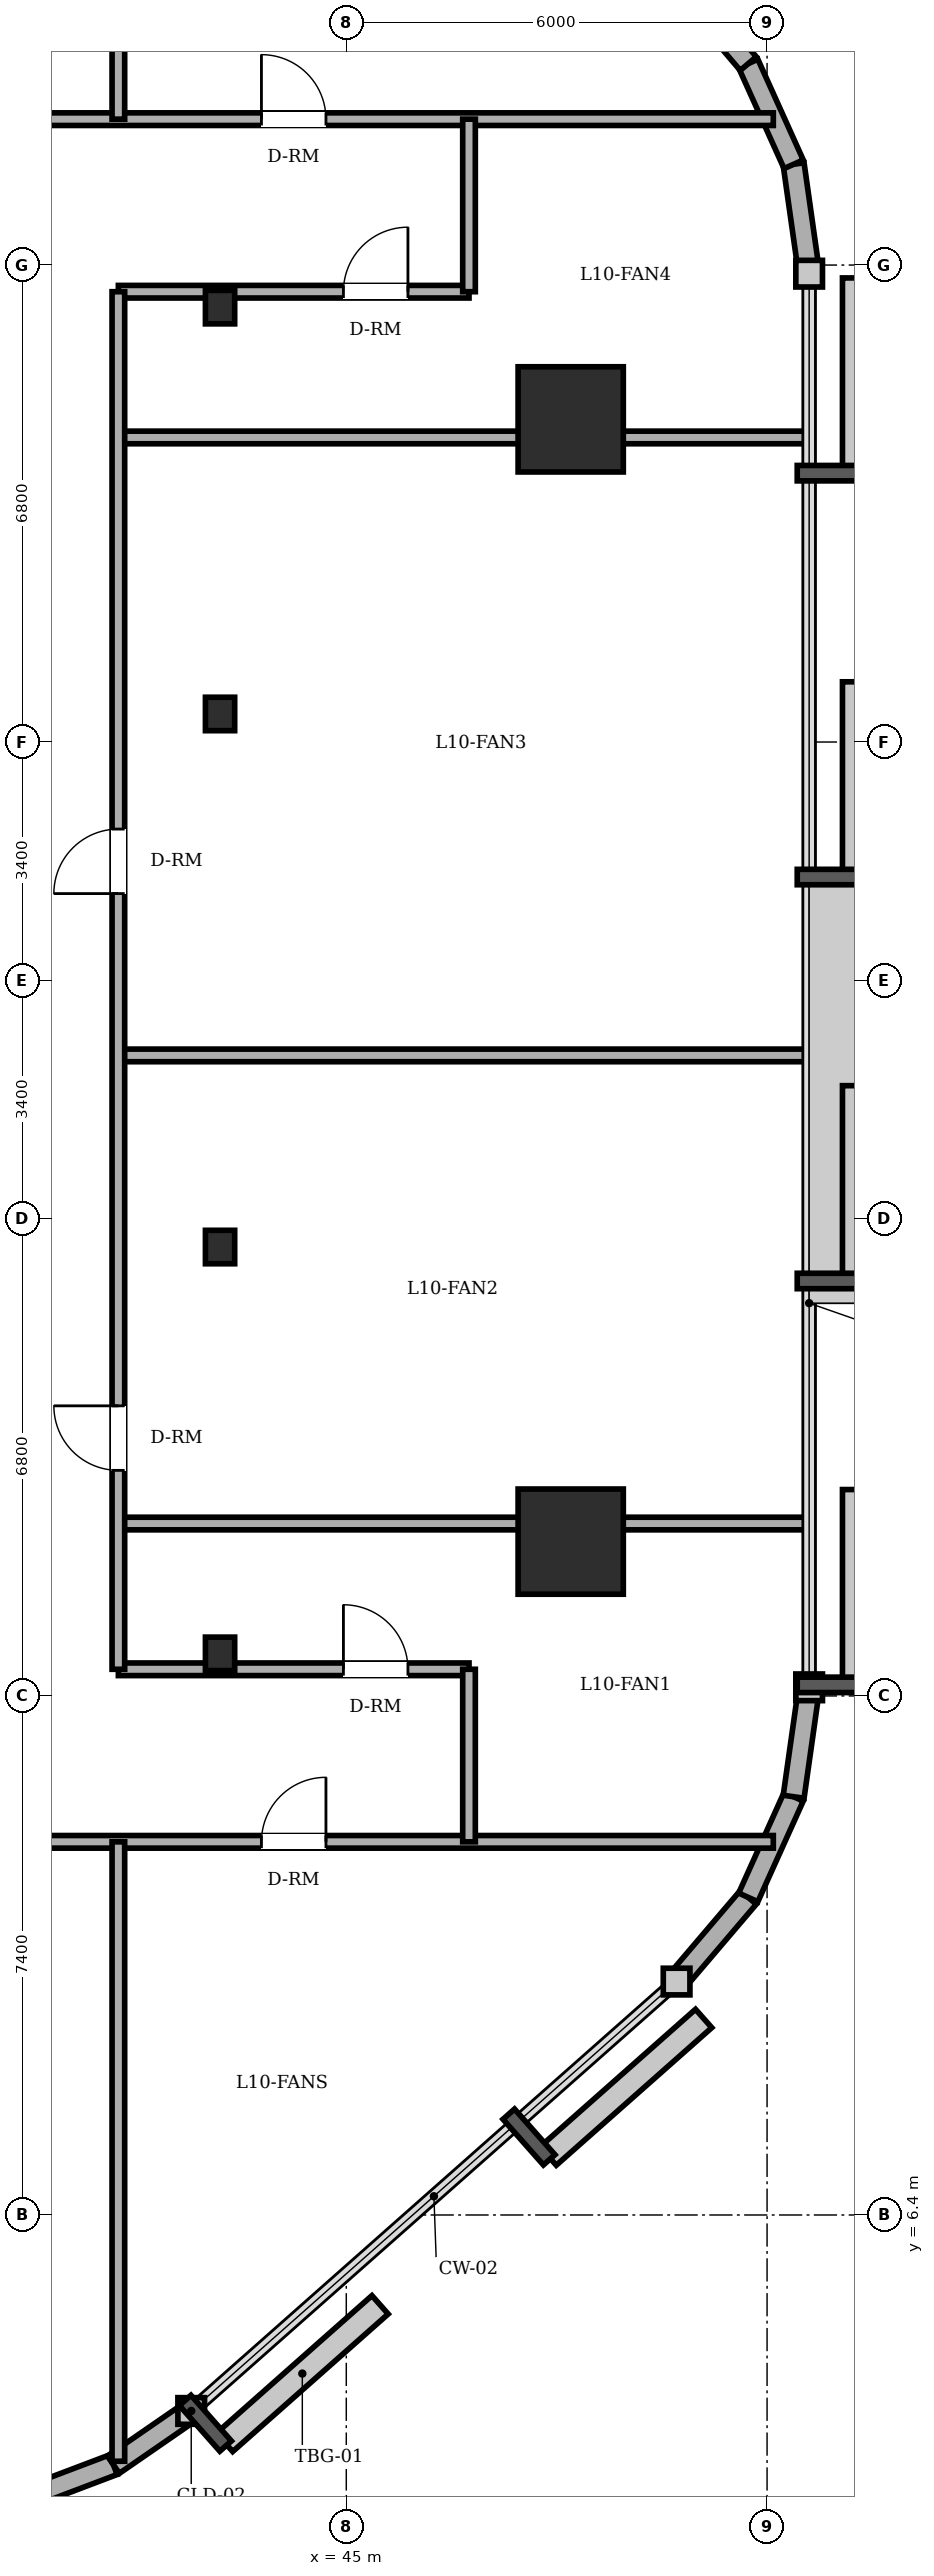
"""IFC4 building model, lengths in metres.
Left out: names, types, materials, properties, quantities, classifications, styles, units other than length and angle.
Written with IfcOpenShell. Run it as: python <this file> out.ifc"""

import sys

from ifc_helpers import new_model, si_unit, direction, frame, frame_2d, origin, origin_2d, place, context, subcontext, project, spatial, rectangle, circle, i_section, extrude, element, fill, save


model = new_model("IFC4")
c1 = context("Model", 3, precision=1e-05, world=origin(), true_north=direction((0.0, 1.0)))
c2 = subcontext(c1, "Body", "Model", "MODEL_VIEW")
j1 = project(units=[si_unit("LENGTHUNIT", "METRE"), si_unit("PLANEANGLEUNIT", "RADIAN")], contexts=[c1])
p1 = place(None, origin())
s1 = spatial("IfcSite", under=j1, at=p1, CompositionType="ELEMENT")
p2 = place(p1, origin())
s2 = spatial("IfcBuilding", under=s1, at=p2, CompositionType="ELEMENT")
p3 = place(p2, frame((0.0, 0.0, 39.6)))
s3 = spatial("IfcBuildingStorey", under=s2, at=p3, CompositionType="ELEMENT", Elevation=39.6)
for number, where, z_axis, x_axis in (
    (1, (48.2, 16.0, 0.0), (0.0, 0.0, 1.0), (1.0, 0.0, 0.0)),
    (2, (48.2, 32.0, 0.0), (0.0, 0.0, 1.0), (1.0, 0.0, 0.0)),
):
    element("IfcColumn", number, at=place(p3, frame(where, z_axis=z_axis, x_axis=x_axis)), inside=s3, PredefinedType="COLUMN", context=c2, shape_type="SweptSolid", body=[
        extrude(circle(Radius=0.75, at=origin_2d()), origin(), (0.0, 0.0, 1.0), 3.6),
    ])
for number, where, z_axis, x_axis in (
    (3, (43.2, 14.4, 0.0), (0.0, 0.0, 1.0), (1.0, 0.0, 0.0)),
    (4, (43.2, 20.2, 0.0), (0.0, 0.0, 1.0), (1.0, 0.0, 0.0)),
    (5, (43.2, 27.8, 0.0), (0.0, 0.0, 1.0), (1.0, 0.0, 0.0)),
    (6, (43.2, 33.6, 0.0), (0.0, 0.0, 1.0), (1.0, 0.0, 0.0)),
):
    element("IfcColumn", number, at=place(p3, frame(where, z_axis=z_axis, x_axis=x_axis)), inside=s3, PredefinedType="COLUMN", context=c2, shape_type="SweptSolid", body=[
        extrude(i_section(OverallWidth=0.417, OverallDepth=0.477, WebThickness=0.036, FlangeThickness=0.057, FilletRadius=0.015, at=origin_2d()), origin(), (0.0, 0.0, 1.0), 3.6),
    ])
p4 = place(p3, frame((40.417, 2.362, 0.0), z_axis=(0.0, 0.0, 1.0), x_axis=(0.935156721165, 0.354234254216, 0.0)))
e7 = element("IfcWall", 7, at=p4, inside=s3, PredefinedType="SOLIDWALL", context=c2, shape_type="SweptSolid", body=[
    extrude(rectangle(XDim=1.349, YDim=0.3, at=frame_2d((0.675, 0.0))), origin(), (0.0, 0.0, 1.0), 3.4),
])
p5 = place(p3, frame((41.679, 2.84, 0.0), z_axis=(0.0, 0.0, 1.0), x_axis=(0.823116500192, 0.567872544777, 0.0)))
e8 = element("IfcWall", 8, at=p5, inside=s3, PredefinedType="SOLIDWALL", context=c2, shape_type="SweptSolid", body=[
    extrude(rectangle(XDim=1.349, YDim=0.3, at=frame_2d((0.674, 0.0))), origin(), (0.0, 0.0, 1.0), 3.4),
])
p6 = place(p3, frame((49.71, 9.728, 0.0), z_axis=(0.0, 0.0, 1.0), x_axis=(0.648389989909, 0.7613083613, 0.0)))
e9 = element("IfcWall", 9, at=p6, inside=s3, PredefinedType="SOLIDWALL", context=c2, shape_type="SweptSolid", body=[
    extrude(rectangle(XDim=1.576, YDim=0.3, at=frame_2d((0.788, 0.0))), origin(), (0.0, 0.0, 1.0), 3.4),
])
p7 = place(p3, frame((50.732, 10.928, 0.0), z_axis=(0.0, 0.0, 1.0), x_axis=(0.410996558744, 0.911636895206, 0.0)))
e10 = element("IfcWall", 10, at=p7, inside=s3, PredefinedType="SOLIDWALL", context=c2, shape_type="SweptSolid", body=[
    extrude(rectangle(XDim=1.574, YDim=0.3, at=frame_2d((0.787, 0.0))), origin(), (0.0, 0.0, 1.0), 3.4),
])
for number, where, z_axis, x_axis in (
    (11, (51.379, 12.363, 0.0), (0.0, 0.0, 1.0), (0.14, 0.99, 0.0)),
    (12, (51.6, 34.077, 0.0), (0.0, 0.0, 1.0), (-0.14, 0.99, 0.0)),
):
    element("IfcWall", number, at=place(p3, frame(where, z_axis=z_axis, x_axis=x_axis)), inside=s3, PredefinedType="SOLIDWALL", context=c2, shape_type="SweptSolid", body=[
        extrude(rectangle(XDim=1.576, YDim=0.3, at=frame_2d((0.788, 0.0))), origin(), (0.0, 0.0, 1.0), 3.4),
    ])
p8 = place(p3, frame((51.379, 35.637, 0.0), z_axis=(0.0, 0.0, 1.0), x_axis=(-0.410996558744, 0.911636895206, 0.0)))
e13 = element("IfcWall", 13, at=p8, inside=s3, PredefinedType="SOLIDWALL", context=c2, shape_type="SweptSolid", body=[
    extrude(rectangle(XDim=1.574, YDim=0.3, at=frame_2d((0.787, 0.0))), origin(), (0.0, 0.0, 1.0), 3.4),
])
p9 = place(p3, frame((50.732, 37.072, 0.0), z_axis=(0.0, 0.0, 1.0), x_axis=(-0.648389989909, 0.7613083613, 0.0)))
e14 = element("IfcWall", 14, at=p9, inside=s3, PredefinedType="SOLIDWALL", context=c2, shape_type="SweptSolid", body=[
    extrude(rectangle(XDim=1.576, YDim=0.3, at=frame_2d((0.788, 0.0))), origin(), (0.0, 0.0, 1.0), 3.4),
])
p10 = place(p3, frame((3.4, 11.72, 0.0), z_axis=(0.0, 0.0, 1.0), x_axis=(1.0, 0.0, 0.0)))
e15 = element("IfcWall", 15, at=p10, inside=s3, PredefinedType="PARTITIONING", context=c2, shape_type="SweptSolid", body=[
    extrude(rectangle(XDim=47.689, YDim=0.18, at=frame_2d((23.845, 0.0))), origin(), (0.0, 0.0, 1.0), 3.4),
])
p11 = place(p10, frame((21.24, 0.0, 0.0)))
e16 = element("IfcOpeningElement", 16, at=p11, cuts=e15, PredefinedType="OPENING", context=c2, shape_type="SweptSolid", body=[
    extrude(rectangle(XDim=0.92, YDim=2.1, at=frame_2d((0.46, 1.05))), frame((0.0, 0.1, 0.0), z_axis=(0.0, -1.0, 0.0), x_axis=(1.0, 0.0, 0.0)), (0.0, 0.0, 1.0), 0.2),
])
p12 = place(p10, frame((40.39, 0.0, 0.0)))
e17 = element("IfcOpeningElement", 17, at=p12, cuts=e15, PredefinedType="OPENING", context=c2, shape_type="SweptSolid", body=[
    extrude(rectangle(XDim=0.92, YDim=2.1, at=frame_2d((0.46, 1.05))), frame((0.0, 0.1, 0.0), z_axis=(0.0, -1.0, 0.0), x_axis=(1.0, 0.0, 0.0)), (0.0, 0.0, 1.0), 0.2),
])
p13 = place(p10, frame((10.74, 0.0, 0.0)))
e18 = element("IfcOpeningElement", 18, at=p13, cuts=e15, PredefinedType="OPENING", context=c2, shape_type="SweptSolid", body=[
    extrude(rectangle(XDim=0.92, YDim=2.1, at=frame_2d((0.46, 1.05))), frame((0.0, 0.1, 0.0), z_axis=(0.0, -1.0, 0.0), x_axis=(1.0, 0.0, 0.0)), (0.0, 0.0, 1.0), 0.2),
])
p14 = place(p10, frame((30.515, 0.0, 0.0)))
e19 = element("IfcOpeningElement", 19, at=p14, cuts=e15, PredefinedType="OPENING", context=c2, shape_type="SweptSolid", body=[
    extrude(rectangle(XDim=0.92, YDim=2.1, at=frame_2d((0.46, 1.05))), frame((0.0, 0.1, 0.0), z_axis=(0.0, -1.0, 0.0), x_axis=(1.0, 0.0, 0.0)), (0.0, 0.0, 1.0), 0.2),
])
p15 = place(p3, frame((41.75, 14.18, 0.0), z_axis=(0.0, 0.0, 1.0), x_axis=(1.0, 0.0, 0.0)))
e20 = element("IfcWall", 20, at=p15, inside=s3, PredefinedType="PARTITIONING", context=c2, shape_type="SweptSolid", body=[
    extrude(rectangle(XDim=5.0, YDim=0.18, at=frame_2d((2.5, 0.0))), origin(), (0.0, 0.0, 1.0), 2.782),
])
p16 = place(p15, frame((3.209, 0.0, 0.0)))
e21 = element("IfcOpeningElement", 21, at=p16, cuts=e20, PredefinedType="OPENING", context=c2, shape_type="SweptSolid", body=[
    extrude(rectangle(XDim=0.92, YDim=2.1, at=frame_2d((0.46, 1.05))), frame((0.0, 0.1, 0.0), z_axis=(0.0, -1.0, 0.0), x_axis=(1.0, 0.0, 0.0)), (0.0, 0.0, 1.0), 0.2),
])
for number, where, z_axis, x_axis in (
    (22, (41.75, 16.258, 0.0), (0.0, 0.0, 1.0), (1.0, 0.0, 0.0)),
    (23, (41.75, 22.932, 0.0), (0.0, 0.0, 1.0), (1.0, 0.0, 0.0)),
    (24, (41.75, 31.742, 0.0), (0.0, 0.0, 1.0), (1.0, 0.0, 0.0)),
):
    element("IfcWall", number, at=place(p3, frame(where, z_axis=z_axis, x_axis=x_axis)), inside=s3, PredefinedType="PARTITIONING", context=c2, shape_type="SweptSolid", body=[
        extrude(rectangle(XDim=9.85, YDim=0.18, at=frame_2d((4.925, 0.0))), origin(), (0.0, 0.0, 1.0), 3.4),
    ])
p17 = place(p3, frame((41.75, 33.82, 0.0), z_axis=(0.0, 0.0, 1.0), x_axis=(1.0, 0.0, 0.0)))
e25 = element("IfcWall", 25, at=p17, inside=s3, PredefinedType="PARTITIONING", context=c2, shape_type="SweptSolid", body=[
    extrude(rectangle(XDim=5.0, YDim=0.18, at=frame_2d((2.5, 0.0))), origin(), (0.0, 0.0, 1.0), 2.782),
])
p18 = place(p17, frame((3.209, 0.0, 0.0)))
e26 = element("IfcOpeningElement", 26, at=p18, cuts=e25, PredefinedType="OPENING", context=c2, shape_type="SweptSolid", body=[
    extrude(rectangle(XDim=0.92, YDim=2.1, at=frame_2d((0.46, 1.05))), frame((0.0, 0.1, 0.0), z_axis=(0.0, -1.0, 0.0), x_axis=(1.0, 0.0, 0.0)), (0.0, 0.0, 1.0), 0.2),
])
p19 = place(p3, frame((3.4, 36.28, 0.0), z_axis=(0.0, 0.0, 1.0), x_axis=(1.0, 0.0, 0.0)))
e27 = element("IfcWall", 27, at=p19, inside=s3, PredefinedType="PARTITIONING", context=c2, shape_type="SweptSolid", body=[
    extrude(rectangle(XDim=47.689, YDim=0.18, at=frame_2d((23.845, 0.0))), origin(), (0.0, 0.0, 1.0), 3.4),
])
p20 = place(p19, frame((21.05, 0.0, 0.0)))
e28 = element("IfcOpeningElement", 28, at=p20, cuts=e27, PredefinedType="OPENING", context=c2, shape_type="SweptSolid", body=[
    extrude(rectangle(XDim=0.9, YDim=2.1, at=frame_2d((0.45, 1.05))), frame((0.0, 0.1, 0.0), z_axis=(0.0, -1.0, 0.0), x_axis=(1.0, 0.0, 0.0)), (0.0, 0.0, 1.0), 0.2),
])
p21 = place(p19, frame((24.67, 0.0, 0.0)))
e29 = element("IfcOpeningElement", 29, at=p21, cuts=e27, PredefinedType="OPENING", context=c2, shape_type="SweptSolid", body=[
    extrude(rectangle(XDim=0.86, YDim=2.1, at=frame_2d((0.43, 1.05))), frame((0.0, 0.1, 0.0), z_axis=(0.0, -1.0, 0.0), x_axis=(1.0, 0.0, 0.0)), (0.0, 0.0, 1.0), 0.2),
])
p22 = place(p19, frame((40.39, 0.0, 0.0)))
e30 = element("IfcOpeningElement", 30, at=p22, cuts=e27, PredefinedType="OPENING", context=c2, shape_type="SweptSolid", body=[
    extrude(rectangle(XDim=0.92, YDim=2.1, at=frame_2d((0.46, 1.05))), frame((0.0, 0.1, 0.0), z_axis=(0.0, -1.0, 0.0), x_axis=(1.0, 0.0, 0.0)), (0.0, 0.0, 1.0), 0.2),
])
p23 = place(p19, frame((4.699, 0.0, 0.0)))
e31 = element("IfcOpeningElement", 31, at=p23, cuts=e27, PredefinedType="OPENING", context=c2, shape_type="SweptSolid", body=[
    extrude(rectangle(XDim=0.92, YDim=2.1, at=frame_2d((0.46, 1.05))), frame((0.0, 0.1, 0.0), z_axis=(0.0, -1.0, 0.0), x_axis=(1.0, 0.0, 0.0)), (0.0, 0.0, 1.0), 0.2),
])
p24 = place(p19, frame((13.298, 0.0, 0.0)))
e32 = element("IfcOpeningElement", 32, at=p24, cuts=e27, PredefinedType="OPENING", context=c2, shape_type="SweptSolid", body=[
    extrude(rectangle(XDim=0.92, YDim=2.1, at=frame_2d((0.46, 1.05))), frame((0.0, 0.1, 0.0), z_axis=(0.0, -1.0, 0.0), x_axis=(1.0, 0.0, 0.0)), (0.0, 0.0, 1.0), 0.2),
])
p25 = place(p19, frame((32.215, 0.0, 0.0)))
e33 = element("IfcOpeningElement", 33, at=p25, cuts=e27, PredefinedType="OPENING", context=c2, shape_type="SweptSolid", body=[
    extrude(rectangle(XDim=0.92, YDim=2.1, at=frame_2d((0.46, 1.05))), frame((0.0, 0.1, 0.0), z_axis=(0.0, -1.0, 0.0), x_axis=(1.0, 0.0, 0.0)), (0.0, 0.0, 1.0), 0.2),
])
p26 = place(p3, frame((41.75, 2.889, 0.0), z_axis=(0.0, 0.0, 1.0), x_axis=(0.0, 1.0, 0.0)))
e34 = element("IfcWall", 34, at=p26, inside=s3, PredefinedType="PARTITIONING", context=c2, shape_type="SweptSolid", body=[
    extrude(rectangle(XDim=8.831, YDim=0.18, at=frame_2d((4.416, 0.0))), origin(), (0.0, 0.0, 1.0), 2.782),
])
p27 = place(p3, frame((41.75, 14.18, 0.0), z_axis=(0.0, 0.0, 1.0), x_axis=(0.0, 1.0, 0.0)))
e35 = element("IfcWall", 35, at=p27, inside=s3, PredefinedType="PARTITIONING", context=c2, shape_type="SweptSolid", body=[
    extrude(rectangle(XDim=19.64, YDim=0.18, at=frame_2d((9.82, 0.0))), origin(), (0.0, 0.0, 1.0), 3.4),
])
p28 = place(p27, frame((2.836, 0.0, 0.0)))
e36 = element("IfcOpeningElement", 36, at=p28, cuts=e35, PredefinedType="OPENING", context=c2, shape_type="SweptSolid", body=[
    extrude(rectangle(XDim=0.92, YDim=2.1, at=frame_2d((0.46, 1.05))), frame((0.0, 0.1, 0.0), z_axis=(0.0, -1.0, 0.0), x_axis=(1.0, 0.0, 0.0)), (0.0, 0.0, 1.0), 0.2),
])
p29 = place(p27, frame((11.059, 0.0, 0.0)))
e37 = element("IfcOpeningElement", 37, at=p29, cuts=e35, PredefinedType="OPENING", context=c2, shape_type="SweptSolid", body=[
    extrude(rectangle(XDim=0.92, YDim=2.1, at=frame_2d((0.46, 1.05))), frame((0.0, 0.1, 0.0), z_axis=(0.0, -1.0, 0.0), x_axis=(1.0, 0.0, 0.0)), (0.0, 0.0, 1.0), 0.2),
])
p30 = place(p3, frame((41.75, 36.28, 0.0), z_axis=(0.0, 0.0, 1.0), x_axis=(0.0, 1.0, 0.0)))
e38 = element("IfcWall", 38, at=p30, inside=s3, PredefinedType="PARTITIONING", context=c2, shape_type="SweptSolid", body=[
    extrude(rectangle(XDim=8.831, YDim=0.18, at=frame_2d((4.416, 0.0))), origin(), (0.0, 0.0, 1.0), 2.782),
])
for number, where, z_axis, x_axis in (
    (39, (46.75, 11.72, 0.0), (0.0, 0.0, 1.0), (0.0, 1.0, 0.0)),
    (40, (46.75, 33.82, 0.0), (0.0, 0.0, 1.0), (0.0, 1.0, 0.0)),
):
    element("IfcWall", number, at=place(p3, frame(where, z_axis=z_axis, x_axis=x_axis)), inside=s3, PredefinedType="PARTITIONING", context=c2, shape_type="SweptSolid", body=[
        extrude(rectangle(XDim=2.46, YDim=0.18, at=frame_2d((1.23, 0.0))), origin(), (0.0, 0.0, 1.0), 3.4),
    ])
p31 = place(p16, origin())
e41 = element("IfcDoor", 41, at=p31, inside=s3, OperationType="SINGLE_SWING_LEFT", PredefinedType="DOOR", context=c2, shape_type="SweptSolid", body=[
    extrude(rectangle(XDim=0.92, YDim=2.1, at=frame_2d((0.46, 1.05))), frame((0.0, 0.025, 0.0), z_axis=(0.0, -1.0, 0.0), x_axis=(1.0, 0.0, 0.0)), (0.0, 0.0, 1.0), 0.05),
])
fill(e21, e41)
p32 = place(p28, origin())
e42 = element("IfcDoor", 42, at=p32, inside=s3, OperationType="SINGLE_SWING_RIGHT", PredefinedType="DOOR", context=c2, shape_type="SweptSolid", body=[
    extrude(rectangle(XDim=0.92, YDim=2.1, at=frame_2d((0.46, 1.05))), frame((0.0, 0.025, 0.0), z_axis=(0.0, -1.0, 0.0), x_axis=(1.0, 0.0, 0.0)), (0.0, 0.0, 1.0), 0.05),
])
fill(e36, e42)
p33 = place(p29, origin())
e43 = element("IfcDoor", 43, at=p33, inside=s3, OperationType="SINGLE_SWING_LEFT", PredefinedType="DOOR", context=c2, shape_type="SweptSolid", body=[
    extrude(rectangle(XDim=0.92, YDim=2.1, at=frame_2d((0.46, 1.05))), frame((0.0, 0.025, 0.0), z_axis=(0.0, -1.0, 0.0), x_axis=(1.0, 0.0, 0.0)), (0.0, 0.0, 1.0), 0.05),
])
fill(e37, e43)
p34 = place(p18, origin())
e44 = element("IfcDoor", 44, at=p34, inside=s3, OperationType="SINGLE_SWING_RIGHT", PredefinedType="DOOR", context=c2, shape_type="SweptSolid", body=[
    extrude(rectangle(XDim=0.92, YDim=2.1, at=frame_2d((0.46, 1.05))), frame((0.0, 0.025, 0.0), z_axis=(0.0, -1.0, 0.0), x_axis=(1.0, 0.0, 0.0)), (0.0, 0.0, 1.0), 0.05),
])
fill(e26, e44)
p35 = place(p22, origin())
e45 = element("IfcDoor", 45, at=p35, inside=s3, OperationType="SINGLE_SWING_LEFT", PredefinedType="DOOR", context=c2, shape_type="SweptSolid", body=[
    extrude(rectangle(XDim=0.92, YDim=2.1, at=frame_2d((0.46, 1.05))), frame((0.0, 0.025, 0.0), z_axis=(0.0, -1.0, 0.0), x_axis=(1.0, 0.0, 0.0)), (0.0, 0.0, 1.0), 0.05),
])
fill(e30, e45)
p36 = place(p12, origin())
e46 = element("IfcDoor", 46, at=p36, inside=s3, OperationType="SINGLE_SWING_RIGHT", PredefinedType="DOOR", context=c2, shape_type="SweptSolid", body=[
    extrude(rectangle(XDim=0.92, YDim=2.1, at=frame_2d((0.46, 1.05))), frame((0.0, 0.025, 0.0), z_axis=(0.0, -1.0, 0.0), x_axis=(1.0, 0.0, 0.0)), (0.0, 0.0, 1.0), 0.05),
])
fill(e17, e46)
save(model, sys.argv[1])
